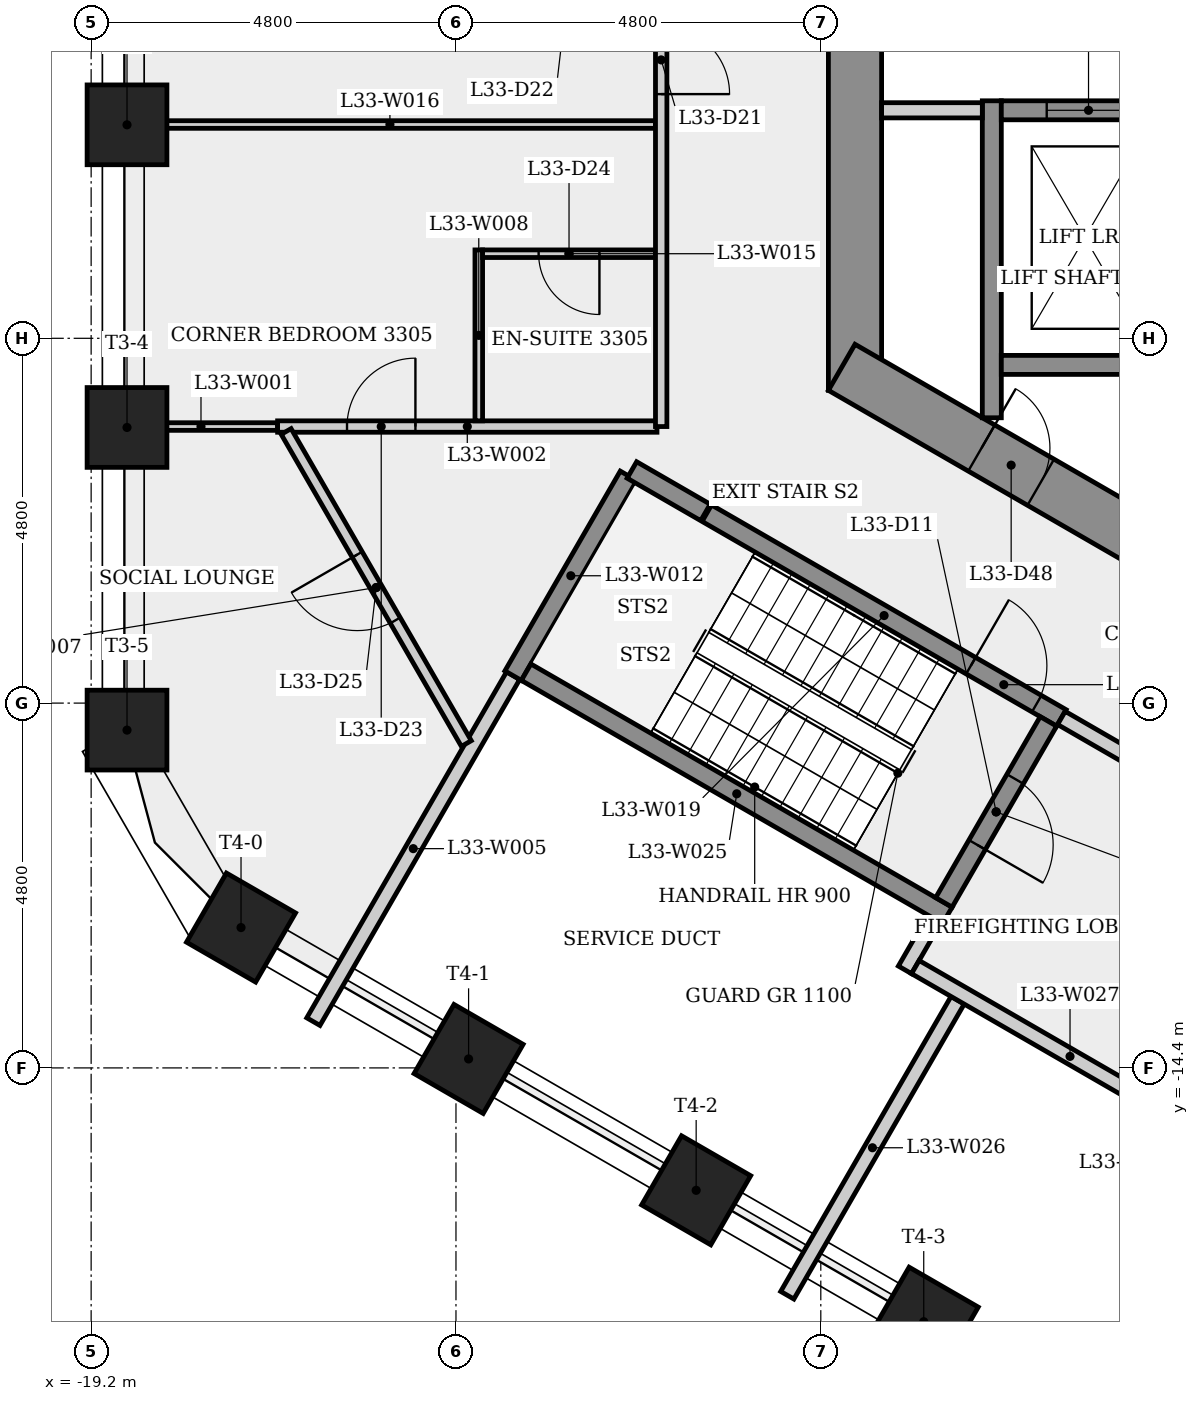
"""IFC4 building model, lengths in metres.
Left out: names, types, materials, properties, quantities, classifications, styles, units other than length and angle.
Written with IfcOpenShell. Run it as: python <this file> out.ifc"""

import sys

from ifc_helpers import new_model, si_unit, direction, frame, frame_2d, origin, origin_2d, place, context, subcontext, project, spatial, rectangle, extrude, element, fill, save


model = new_model("IFC4")
c1 = context("Model", 3, precision=1e-05, world=origin(), true_north=direction((0.0, 1.0)))
c2 = subcontext(c1, "Body", "Model", "MODEL_VIEW")
j1 = project(units=[si_unit("LENGTHUNIT", "METRE"), si_unit("PLANEANGLEUNIT", "RADIAN")], contexts=[c1])
p1 = place(None, origin())
s1 = spatial("IfcSite", under=j1, at=p1, CompositionType="ELEMENT")
p2 = place(p1, origin())
s2 = spatial("IfcBuilding", under=s1, at=p2, CompositionType="ELEMENT")
p3 = place(p2, frame((0.0, 0.0, 124.5)))
s3 = spatial("IfcBuildingStorey", under=s2, at=p3, CompositionType="ELEMENT", Elevation=124.5)
p4 = place(p3, frame((-9.15, 5.485, 0.0), z_axis=(0.0, 0.0, 1.0), x_axis=(0.0, -1.0, 0.0)))
e1 = element("IfcWall", 1, at=p4, inside=s3, PredefinedType="SHEAR", context=c2, shape_type="SweptSolid", body=[
    extrude(rectangle(XDim=10.97, YDim=0.7, at=frame_2d((5.485, 0.0))), origin(), (0.0, 0.0, 1.0), 4.0),
])
p5 = place(p4, frame((4.685, 0.0, 0.0)))
e2 = element("IfcOpeningElement", 2, at=p5, cuts=e1, PredefinedType="OPENING", context=c2, shape_type="SweptSolid", body=[
    extrude(rectangle(XDim=1.6, YDim=2.1, at=frame_2d((0.8, 1.05))), frame((0.0, 0.36, 0.0), z_axis=(0.0, -1.0, 0.0), x_axis=(1.0, 0.0, 0.0)), (0.0, 0.0, 1.0), 0.72),
])
p6 = place(p3, frame((-9.325, -5.182, 0.0), z_axis=(0.0, 0.0, 1.0), x_axis=(0.866023993627, -0.500002442456, 0.0)))
e3 = element("IfcWall", 3, at=p6, inside=s3, PredefinedType="SHEAR", context=c2, shape_type="SweptSolid", body=[
    extrude(rectangle(XDim=10.97, YDim=0.7, at=frame_2d((5.485, 0.0))), origin(), (0.0, 0.0, 1.0), 4.0),
])
p7 = place(p6, frame((2.125, 0.0, 0.0)))
e4 = element("IfcOpeningElement", 4, at=p7, cuts=e3, PredefinedType="OPENING", context=c2, shape_type="SweptSolid", body=[
    extrude(rectangle(XDim=0.9, YDim=2.1, at=frame_2d((0.45, 1.05))), frame((0.0, 0.36, 0.0), z_axis=(0.0, -1.0, 0.0), x_axis=(1.0, 0.0, 0.0)), (0.0, 0.0, 1.0), 0.72),
])
p8 = place(p6, frame((8.845, 0.0, 0.0)))
e5 = element("IfcOpeningElement", 5, at=p8, cuts=e3, PredefinedType="OPENING", context=c2, shape_type="SweptSolid", body=[
    extrude(rectangle(XDim=0.9, YDim=2.1, at=frame_2d((0.45, 1.05))), frame((0.0, 0.36, 0.0), z_axis=(0.0, -1.0, 0.0), x_axis=(1.0, 0.0, 0.0)), (0.0, 0.0, 1.0), 0.72),
])
for number, where, z_axis, x_axis in (
    (6, (-18.728, -1.991, 0.0), (0.0, 0.0, 1.0), (-1.0, 0.0, 0.0)),
    (7, (-18.728, -5.973, 0.0), (0.0, 0.0, 1.0), (-1.0, 0.0, 0.0)),
    (8, (-18.728, -9.955, 0.0), (0.0, 0.0, 1.0), (-1.0, 0.0, 0.0)),
    (9, (-17.228, -12.553, 0.0), (0.0, 0.0, 1.0), (-0.5, -0.866, 0.0)),
    (10, (-14.234, -14.282, 0.0), (0.0, 0.0, 1.0), (-0.5, -0.866, 0.0)),
    (11, (-11.24, -16.011, 0.0), (0.0, 0.0, 1.0), (-0.5, -0.866, 0.0)),
    (12, (-8.246, -17.739, 0.0), (0.0, 0.0, 1.0), (-0.5, -0.866, 0.0)),
):
    element("IfcColumn", number, at=place(p3, frame(where, z_axis=z_axis, x_axis=x_axis)), inside=s3, PredefinedType="COLUMN", context=c2, shape_type="SweptSolid", body=[
        extrude(rectangle(XDim=1.05, YDim=1.05, at=origin_2d()), origin(), (0.0, 0.0, 1.0), 4.0),
    ])
p9 = place(p3, frame((-16.747, -5.961, 0.0), z_axis=(0.0, 0.0, 1.0), x_axis=(-1.0, 0.0, 0.0)))
e13 = element("IfcWall", 13, at=p9, inside=s3, PredefinedType="PARTITIONING", context=c2, shape_type="SweptSolid", body=[
    extrude(rectangle(XDim=2.016, YDim=0.1, at=frame_2d((1.008, 0.0))), origin(), (0.0, 0.0, 1.0), 3.6),
])
p10 = place(p3, frame((-16.747, -5.961, 0.0), z_axis=(0.0, 0.0, 1.0), x_axis=(1.0, 0.0, 0.0)))
e14 = element("IfcWall", 14, at=p10, inside=s3, PredefinedType="PARTITIONING", context=c2, shape_type="SweptSolid", body=[
    extrude(rectangle(XDim=4.991, YDim=0.15, at=frame_2d((2.496, 0.0))), origin(), (0.0, 0.0, 1.0), 3.6),
])
p11 = place(p10, frame((0.913, 0.0, 0.0)))
e15 = element("IfcOpeningElement", 15, at=p11, cuts=e14, PredefinedType="OPENING", context=c2, shape_type="SweptSolid", body=[
    extrude(rectangle(XDim=0.9, YDim=2.1, at=frame_2d((0.45, 1.05))), frame((0.0, 0.085, 0.0), z_axis=(0.0, -1.0, 0.0), x_axis=(1.0, 0.0, 0.0)), (0.0, 0.0, 1.0), 0.17),
])
p12 = place(p3, frame((-16.276, -13.791, 0.0), z_axis=(0.0, 0.0, 1.0), x_axis=(0.499970375258, 0.866042506961, 0.0)))
e16 = element("IfcWall", 16, at=p12, inside=s3, PredefinedType="PLUMBINGWALL", context=c2, shape_type="SweptSolid", body=[
    extrude(rectangle(XDim=5.257, YDim=0.2, at=frame_2d((2.628, 0.0))), origin(), (0.0, 0.0, 1.0), 3.6),
])
p13 = place(p3, frame((-14.264, -10.132, 0.0), z_axis=(0.0, 0.0, 1.0), x_axis=(-0.500004756968, 0.866022657331, 0.0)))
e17 = element("IfcWall", 17, at=p13, inside=s3, PredefinedType="PARTITIONING", context=c2, shape_type="SweptSolid", body=[
    extrude(rectangle(XDim=4.741, YDim=0.15, at=frame_2d((2.371, 0.0))), origin(), (0.0, 0.0, 1.0), 3.6),
])
p14 = place(p13, frame((1.871, 0.0, 0.0)))
e18 = element("IfcOpeningElement", 18, at=p14, cuts=e17, PredefinedType="OPENING", context=c2, shape_type="SweptSolid", body=[
    extrude(rectangle(XDim=1.0, YDim=2.1, at=frame_2d((0.5, 1.05))), frame((0.0, 0.085, 0.0), z_axis=(0.0, -1.0, 0.0), x_axis=(1.0, 0.0, 0.0)), (0.0, 0.0, 1.0), 0.17),
])
p15 = place(p3, frame((-14.1, -3.637, 0.0), z_axis=(0.0, 0.0, 1.0), x_axis=(0.0, -1.0, 0.0)))
e19 = element("IfcWall", 19, at=p15, inside=s3, PredefinedType="PARTITIONING", context=c2, shape_type="SweptSolid", body=[
    extrude(rectangle(XDim=2.249, YDim=0.1, at=frame_2d((1.125, 0.0))), origin(), (0.0, 0.0, 1.0), 3.6),
])
p16 = place(p3, frame((-13.648, -9.239, 0.0), z_axis=(0.0, 0.0, 1.0), x_axis=(0.50000556753, 0.866022189346, 0.0)))
e20 = element("IfcWall", 20, at=p16, inside=s3, PredefinedType="SHEAR", context=c2, shape_type="SweptSolid", body=[
    extrude(rectangle(XDim=3.036, YDim=0.25, at=frame_2d((1.518, 0.0))), origin(), (0.0, 0.0, 1.0), 3.6),
])
p17 = place(p3, frame((-12.085, -6.532, 0.0), z_axis=(0.0, 0.0, 1.0), x_axis=(0.86604373436, -0.499968249168, 0.0)))
e21 = element("IfcWall", 21, at=p17, inside=s3, PredefinedType="SHEAR", context=c2, shape_type="SweptSolid", body=[
    extrude(rectangle(XDim=1.118, YDim=0.25, at=frame_2d((0.559, 0.0))), origin(), (0.0, 0.0, 1.0), 3.6),
])
p18 = place(p3, frame((-11.775, -3.687, 0.0), z_axis=(0.0, 0.0, 1.0), x_axis=(-1.0, 0.0, 0.0)))
e22 = element("IfcWall", 22, at=p18, inside=s3, PredefinedType="PARTITIONING", context=c2, shape_type="SweptSolid", body=[
    extrude(rectangle(XDim=2.275, YDim=0.1, at=frame_2d((1.138, 0.0))), origin(), (0.0, 0.0, 1.0), 3.6),
])
p19 = place(p18, frame((0.738, 0.0, 0.0)))
e23 = element("IfcOpeningElement", 23, at=p19, cuts=e22, PredefinedType="OPENING", context=c2, shape_type="SweptSolid", body=[
    extrude(rectangle(XDim=0.8, YDim=2.1, at=frame_2d((0.4, 1.05))), frame((0.0, 0.06, 0.0), z_axis=(0.0, -1.0, 0.0), x_axis=(1.0, 0.0, 0.0)), (0.0, 0.0, 1.0), 0.12),
])
p20 = place(p3, frame((-11.775, -1.987, 0.0), z_axis=(0.0, 0.0, 1.0), x_axis=(-1.0, 0.0, 0.0)))
e24 = element("IfcWall", 24, at=p20, inside=s3, PredefinedType="PARTITIONING", context=c2, shape_type="SweptSolid", body=[
    extrude(rectangle(XDim=6.988, YDim=0.1, at=frame_2d((3.494, 0.0))), origin(), (0.0, 0.0, 1.0), 3.6),
])
p21 = place(p3, frame((-11.7, 6.036, 0.0), z_axis=(0.0, 0.0, 1.0), x_axis=(0.0, -1.0, 0.0)))
e25 = element("IfcWall", 25, at=p21, inside=s3, PredefinedType="PARTITIONING", context=c2, shape_type="SweptSolid", body=[
    extrude(rectangle(XDim=11.997, YDim=0.15, at=frame_2d((5.999, 0.0))), origin(), (0.0, 0.0, 1.0), 3.6),
])
p22 = place(p21, frame((6.723, 0.0, 0.0)))
e26 = element("IfcOpeningElement", 26, at=p22, cuts=e25, PredefinedType="OPENING", context=c2, shape_type="SweptSolid", body=[
    extrude(rectangle(XDim=0.9, YDim=2.1, at=frame_2d((0.45, 1.05))), frame((0.0, 0.085, 0.0), z_axis=(0.0, -1.0, 0.0), x_axis=(1.0, 0.0, 0.0)), (0.0, 0.0, 1.0), 0.17),
])
p23 = place(p3, frame((-11.1, -7.101, 0.0), z_axis=(0.0, 0.0, 1.0), x_axis=(0.866028615007, -0.499994437958, 0.0)))
e27 = element("IfcWall", 27, at=p23, inside=s3, PredefinedType="SHEAR", context=c2, shape_type="SweptSolid", body=[
    extrude(rectangle(XDim=5.387, YDim=0.25, at=frame_2d((2.694, 0.0))), origin(), (0.0, 0.0, 1.0), 3.6),
])
p24 = place(p23, frame((4.012, 0.0, 0.0)))
e28 = element("IfcOpeningElement", 28, at=p24, cuts=e27, PredefinedType="OPENING", context=c2, shape_type="SweptSolid", body=[
    extrude(rectangle(XDim=1.0, YDim=2.1, at=frame_2d((0.5, 1.05))), frame((0.0, 0.135, 0.0), z_axis=(0.0, -1.0, 0.0), x_axis=(1.0, 0.0, 0.0)), (0.0, 0.0, 1.0), 0.27),
])
p25 = place(p3, frame((-8.493, -13.11, 0.0), z_axis=(0.0, 0.0, 1.0), x_axis=(0.500067724834, 0.865986299303, 0.0)))
e29 = element("IfcWall", 29, at=p25, inside=s3, PredefinedType="PLUMBINGWALL", context=c2, shape_type="SweptSolid", body=[
    extrude(rectangle(XDim=0.775, YDim=0.2, at=frame_2d((0.388, 0.0))), origin(), (0.0, 0.0, 1.0), 3.6),
])
p26 = place(p3, frame((-7.935, -12.393, 0.0), z_axis=(0.0, 0.0, 1.0), x_axis=(-0.866025499775, 0.499999833739, 0.0)))
e30 = element("IfcWall", 30, at=p26, inside=s3, PredefinedType="SHEAR", context=c2, shape_type="SweptSolid", body=[
    extrude(rectangle(XDim=6.4, YDim=0.25, at=frame_2d((3.2, 0.0))), origin(), (0.0, 0.0, 1.0), 3.6),
])
p27 = place(p3, frame((-7.8, -13.51, 0.0), z_axis=(0.0, 0.0, 1.0), x_axis=(-0.499994393058, -0.866028640929, 0.0)))
e31 = element("IfcWall", 31, at=p27, inside=s3, PredefinedType="PLUMBINGWALL", context=c2, shape_type="SweptSolid", body=[
    extrude(rectangle(XDim=4.481, YDim=0.2, at=frame_2d((2.241, 0.0))), origin(), (0.0, 0.0, 1.0), 3.6),
])
p28 = place(p3, frame((-8.356, -13.073, 0.0), z_axis=(0.0, 0.0, 1.0), x_axis=(0.866038532462, -0.499977259774, 0.0)))
e32 = element("IfcWall", 32, at=p28, inside=s3, PredefinedType="PLUMBINGWALL", context=c2, shape_type="SweptSolid", body=[
    extrude(rectangle(XDim=4.7, YDim=0.2, at=frame_2d((2.35, 0.0))), origin(), (0.0, 0.0, 1.0), 3.6),
])
p29 = place(p3, frame((-7.35, -5.846, 0.0), z_axis=(0.0, 0.0, 1.0), x_axis=(0.0, 1.0, 0.0)))
e33 = element("IfcWall", 33, at=p29, inside=s3, PredefinedType="SHEAR", context=c2, shape_type="SweptSolid", body=[
    extrude(rectangle(XDim=4.171, YDim=0.25, at=frame_2d((2.085, 0.0))), origin(), (0.0, 0.0, 1.0), 3.6),
])
p30 = place(p3, frame((-7.475, -1.8, 0.0), z_axis=(0.0, 0.0, 1.0), x_axis=(-1.0, 0.0, 0.0)))
e34 = element("IfcWall", 34, at=p30, inside=s3, PredefinedType="PARTITIONING", context=c2, shape_type="SweptSolid", body=[
    extrude(rectangle(XDim=1.325, YDim=0.2, at=frame_2d((0.663, 0.0))), origin(), (0.0, 0.0, 1.0), 3.6),
])
p31 = place(p3, frame((-6.605, -9.841, 0.0), z_axis=(0.0, 0.0, 1.0), x_axis=(-0.499996545922, -0.866027397988, 0.0)))
e35 = element("IfcWall", 35, at=p31, inside=s3, PredefinedType="SHEAR", context=c2, shape_type="SweptSolid", body=[
    extrude(rectangle(XDim=2.75, YDim=0.25, at=frame_2d((1.375, 0.0))), origin(), (0.0, 0.0, 1.0), 3.6),
])
p32 = place(p31, frame((0.875, 0.0, 0.0)))
e36 = element("IfcOpeningElement", 36, at=p32, cuts=e35, PredefinedType="OPENING", context=c2, shape_type="SweptSolid", body=[
    extrude(rectangle(XDim=1.0, YDim=2.1, at=frame_2d((0.5, 1.05))), frame((0.0, 0.135, 0.0), z_axis=(0.0, -1.0, 0.0), x_axis=(1.0, 0.0, 0.0)), (0.0, 0.0, 1.0), 0.27),
])
p33 = place(p3, frame((-6.435, -9.795, 0.0), z_axis=(0.0, 0.0, 1.0), x_axis=(0.866012907634, -0.500021643343, 0.0)))
e37 = element("IfcWall", 37, at=p33, inside=s3, PredefinedType="PARTITIONING", context=c2, shape_type="SweptSolid", body=[
    extrude(rectangle(XDim=4.45, YDim=0.2, at=frame_2d((2.225, 0.0))), origin(), (0.0, 0.0, 1.0), 3.6),
])
p34 = place(p33, frame((1.675, 0.0, 0.0)))
e38 = element("IfcOpeningElement", 38, at=p34, cuts=e37, PredefinedType="OPENING", context=c2, shape_type="SweptSolid", body=[
    extrude(rectangle(XDim=1.1, YDim=2.1, at=frame_2d((0.55, 1.05))), frame((0.0, 0.11, 0.0), z_axis=(0.0, -1.0, 0.0), x_axis=(1.0, 0.0, 0.0)), (0.0, 0.0, 1.0), 0.22),
])
p35 = place(p3, frame((-7.225, -5.15, 0.0), z_axis=(0.0, 0.0, 1.0), x_axis=(1.0, 0.0, 0.0)))
e39 = element("IfcWall", 39, at=p35, inside=s3, PredefinedType="SHEAR", context=c2, shape_type="SweptSolid", body=[
    extrude(rectangle(XDim=14.7, YDim=0.25, at=frame_2d((7.35, 0.0))), origin(), (0.0, 0.0, 1.0), 3.6),
])
p36 = place(p3, frame((-7.225, -1.8, 0.0), z_axis=(0.0, 0.0, 1.0), x_axis=(1.0, 0.0, 0.0)))
e40 = element("IfcWall", 40, at=p36, inside=s3, PredefinedType="SHEAR", context=c2, shape_type="SweptSolid", body=[
    extrude(rectangle(XDim=14.7, YDim=0.25, at=frame_2d((7.35, 0.0))), origin(), (0.0, 0.0, 1.0), 3.6),
])
p37 = place(p36, frame((0.597, 0.0, 0.0)))
e41 = element("IfcOpeningElement", 41, at=p37, cuts=e40, PredefinedType="OPENING", context=c2, shape_type="SweptSolid", body=[
    extrude(rectangle(XDim=1.1, YDim=2.1, at=frame_2d((0.55, 1.05))), frame((0.0, 0.135, 0.0), z_axis=(0.0, -1.0, 0.0), x_axis=(1.0, 0.0, 0.0)), (0.0, 0.0, 1.0), 0.27),
])
p38 = place(p36, frame((3.0, 0.0, 0.0)))
e42 = element("IfcOpeningElement", 42, at=p38, cuts=e40, PredefinedType="OPENING", context=c2, shape_type="SweptSolid", body=[
    extrude(rectangle(XDim=1.1, YDim=2.1, at=frame_2d((0.55, 1.05))), frame((0.0, 0.135, 0.0), z_axis=(0.0, -1.0, 0.0), x_axis=(1.0, 0.0, 0.0)), (0.0, 0.0, 1.0), 0.27),
])
p39 = place(p36, frame((5.45, 0.0, 0.0)))
e43 = element("IfcOpeningElement", 43, at=p39, cuts=e40, PredefinedType="OPENING", context=c2, shape_type="SweptSolid", body=[
    extrude(rectangle(XDim=1.1, YDim=2.1, at=frame_2d((0.55, 1.05))), frame((0.0, 0.135, 0.0), z_axis=(0.0, -1.0, 0.0), x_axis=(1.0, 0.0, 0.0)), (0.0, 0.0, 1.0), 0.27),
])
p40 = place(p36, frame((7.9, 0.0, 0.0)))
e44 = element("IfcOpeningElement", 44, at=p40, cuts=e40, PredefinedType="OPENING", context=c2, shape_type="SweptSolid", body=[
    extrude(rectangle(XDim=1.1, YDim=2.1, at=frame_2d((0.55, 1.05))), frame((0.0, 0.135, 0.0), z_axis=(0.0, -1.0, 0.0), x_axis=(1.0, 0.0, 0.0)), (0.0, 0.0, 1.0), 0.27),
])
p41 = place(p36, frame((10.35, 0.0, 0.0)))
e45 = element("IfcOpeningElement", 45, at=p41, cuts=e40, PredefinedType="OPENING", context=c2, shape_type="SweptSolid", body=[
    extrude(rectangle(XDim=1.1, YDim=2.1, at=frame_2d((0.55, 1.05))), frame((0.0, 0.135, 0.0), z_axis=(0.0, -1.0, 0.0), x_axis=(1.0, 0.0, 0.0)), (0.0, 0.0, 1.0), 0.27),
])
p42 = place(p37, origin())
e46 = element("IfcDoor", 46, at=p42, inside=s3, OperationType="SLIDING_TO_LEFT", PredefinedType="DOOR", context=c2, shape_type="SweptSolid", body=[
    extrude(rectangle(XDim=1.1, YDim=2.1, at=frame_2d((0.55, 1.05))), frame((0.0, 0.025, 0.0), z_axis=(0.0, -1.0, 0.0), x_axis=(1.0, 0.0, 0.0)), (0.0, 0.0, 1.0), 0.05),
])
fill(e41, e46)
p43 = place(p24, origin())
e47 = element("IfcDoor", 47, at=p43, inside=s3, OperationType="SINGLE_SWING_LEFT", PredefinedType="DOOR", context=c2, shape_type="SweptSolid", body=[
    extrude(rectangle(XDim=1.0, YDim=2.1, at=frame_2d((0.5, 1.05))), frame((0.0, 0.025, 0.0), z_axis=(0.0, -1.0, 0.0), x_axis=(1.0, 0.0, 0.0)), (0.0, 0.0, 1.0), 0.05),
])
fill(e28, e47)
p44 = place(p32, origin())
e48 = element("IfcDoor", 48, at=p44, inside=s3, OperationType="SINGLE_SWING_RIGHT", PredefinedType="DOOR", context=c2, shape_type="SweptSolid", body=[
    extrude(rectangle(XDim=1.0, YDim=2.1, at=frame_2d((0.5, 1.05))), frame((0.0, 0.025, 0.0), z_axis=(0.0, -1.0, 0.0), x_axis=(1.0, 0.0, 0.0)), (0.0, 0.0, 1.0), 0.05),
])
fill(e36, e48)
p45 = place(p22, origin())
e49 = element("IfcDoor", 49, at=p45, inside=s3, OperationType="SINGLE_SWING_RIGHT", PredefinedType="DOOR", context=c2, shape_type="SweptSolid", body=[
    extrude(rectangle(XDim=0.9, YDim=2.1, at=frame_2d((0.45, 1.05))), frame((0.0, 0.025, 0.0), z_axis=(0.0, -1.0, 0.0), x_axis=(1.0, 0.0, 0.0)), (0.0, 0.0, 1.0), 0.05),
])
fill(e26, e49)
p46 = place(p11, origin())
e50 = element("IfcDoor", 50, at=p46, inside=s3, OperationType="SINGLE_SWING_RIGHT", PredefinedType="DOOR", context=c2, shape_type="SweptSolid", body=[
    extrude(rectangle(XDim=0.9, YDim=2.1, at=frame_2d((0.45, 1.05))), frame((0.0, 0.025, 0.0), z_axis=(0.0, -1.0, 0.0), x_axis=(1.0, 0.0, 0.0)), (0.0, 0.0, 1.0), 0.05),
])
fill(e15, e50)
p47 = place(p19, origin())
e51 = element("IfcDoor", 51, at=p47, inside=s3, OperationType="SINGLE_SWING_LEFT", PredefinedType="DOOR", context=c2, shape_type="SweptSolid", body=[
    extrude(rectangle(XDim=0.8, YDim=2.1, at=frame_2d((0.4, 1.05))), frame((0.0, 0.025, 0.0), z_axis=(0.0, -1.0, 0.0), x_axis=(1.0, 0.0, 0.0)), (0.0, 0.0, 1.0), 0.05),
])
fill(e23, e51)
p48 = place(p14, origin())
e52 = element("IfcDoor", 52, at=p48, inside=s3, OperationType="SINGLE_SWING_RIGHT", PredefinedType="DOOR", context=c2, shape_type="SweptSolid", body=[
    extrude(rectangle(XDim=1.0, YDim=2.1, at=frame_2d((0.5, 1.05))), frame((0.0, 0.025, 0.0), z_axis=(0.0, -1.0, 0.0), x_axis=(1.0, 0.0, 0.0)), (0.0, 0.0, 1.0), 0.05),
])
fill(e18, e52)
p49 = place(p7, origin())
e53 = element("IfcDoor", 53, at=p49, inside=s3, OperationType="SINGLE_SWING_LEFT", PredefinedType="DOOR", context=c2, shape_type="SweptSolid", body=[
    extrude(rectangle(XDim=0.9, YDim=2.1, at=frame_2d((0.45, 1.05))), frame((0.0, 0.025, 0.0), z_axis=(0.0, -1.0, 0.0), x_axis=(1.0, 0.0, 0.0)), (0.0, 0.0, 1.0), 0.05),
])
fill(e4, e53)
save(model, sys.argv[1])
